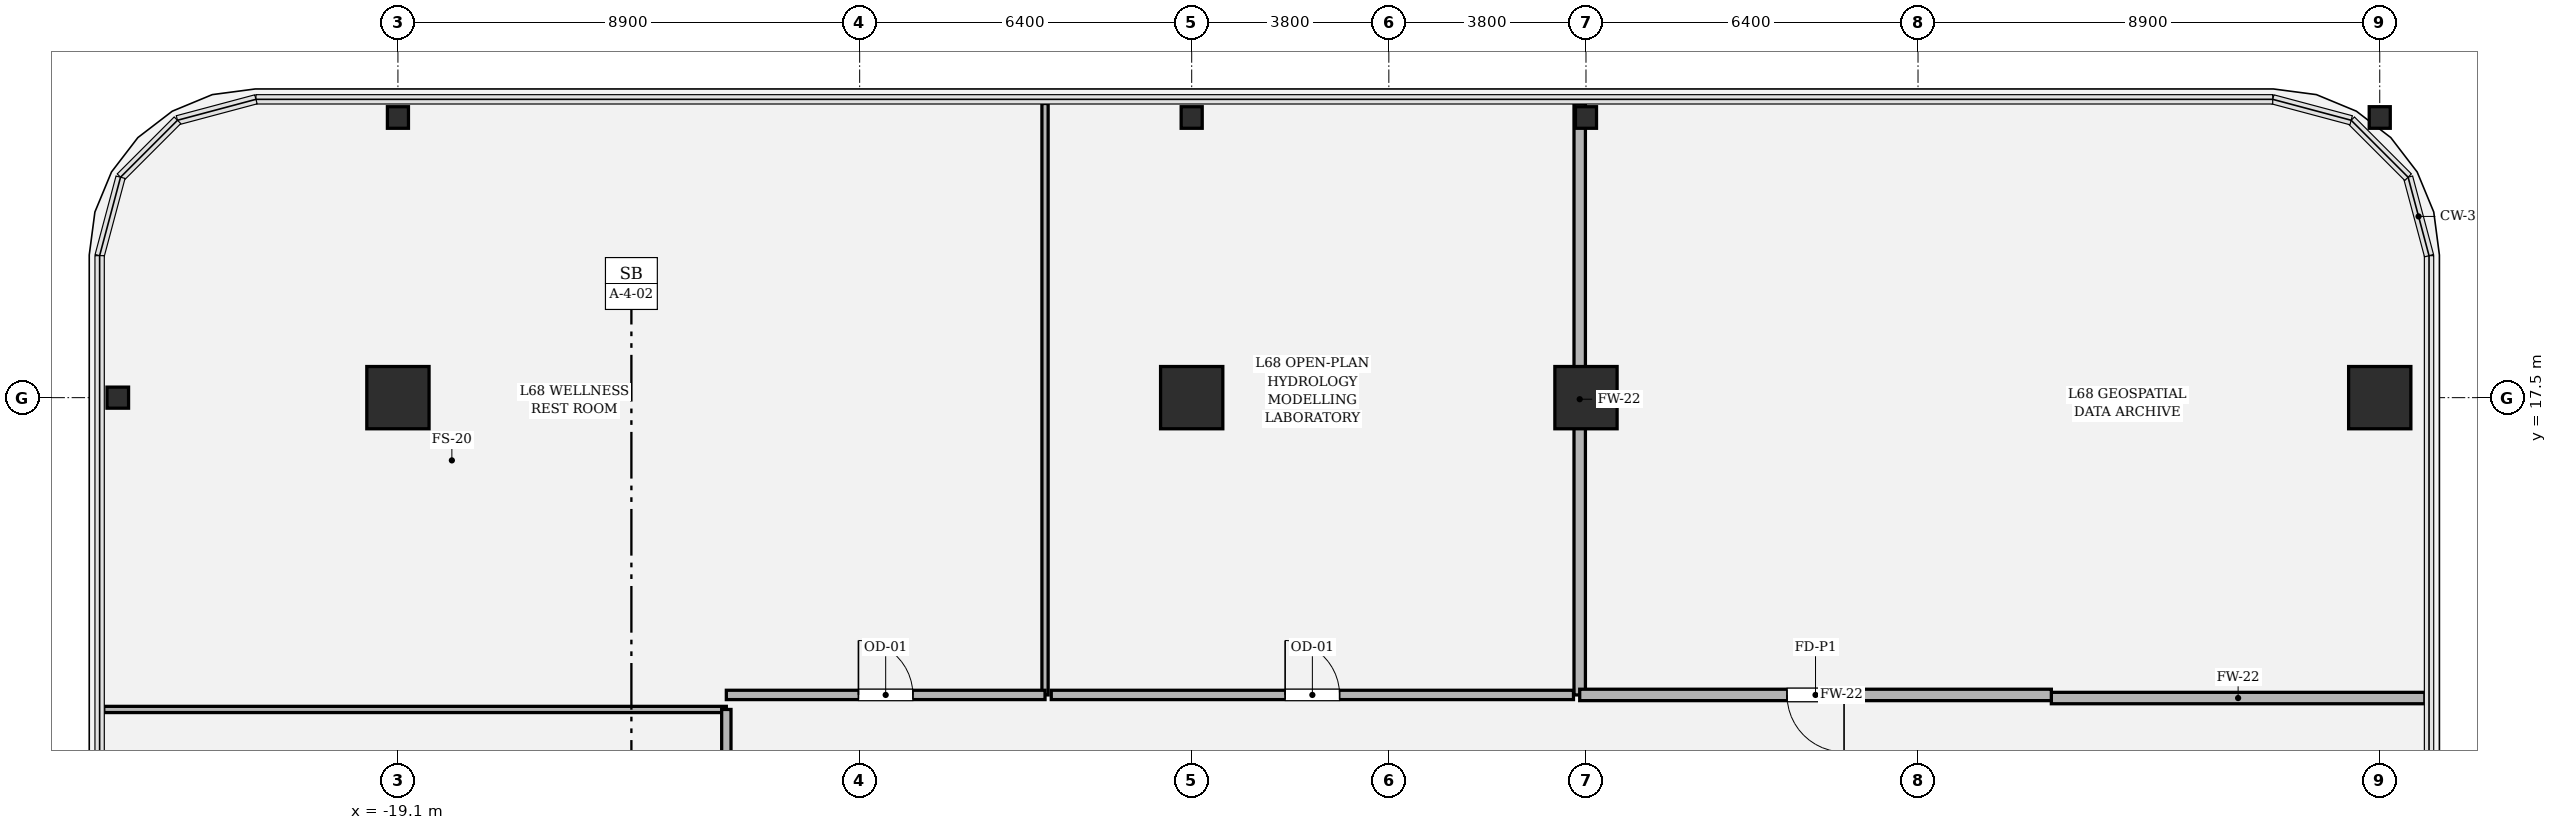
"""IFC4 building model, lengths in metres.
Left out: names, types, materials, properties, quantities, classifications, styles, units other than length and angle.
Written with IfcOpenShell. Run it as: python <this file> out.ifc"""

import sys

from ifc_helpers import new_model, si_unit, direction, frame, frame_2d, origin, origin_2d, place, context, subcontext, project, spatial, rectangle, hollow_rectangle, i_section, extrude, element, fill, save


model = new_model("IFC4")
c1 = context("Model", 3, precision=1e-05, world=origin(), true_north=direction((0.0, 1.0)))
c2 = subcontext(c1, "Body", "Model", "MODEL_VIEW")
j1 = project(units=[si_unit("LENGTHUNIT", "METRE"), si_unit("PLANEANGLEUNIT", "RADIAN")], contexts=[c1])
p1 = place(None, origin())
s1 = spatial("IfcSite", under=j1, at=p1, CompositionType="ELEMENT")
p2 = place(p1, origin())
s2 = spatial("IfcBuilding", under=s1, at=p2, CompositionType="ELEMENT")
p3 = place(p2, frame((0.0, 0.0, 288.0)))
s3 = spatial("IfcBuildingStorey", under=s2, at=p3, CompositionType="ELEMENT", Elevation=288.0)
for number, where, z_axis, x_axis in (
    (1, (19.1, 17.5, 0.0), (0.0, 0.0, 1.0), (1.0, 0.0, 0.0)),
    (2, (3.8, 17.5, 0.0), (0.0, 0.0, 1.0), (1.0, 0.0, 0.0)),
    (3, (-3.8, 17.5, 0.0), (0.0, 0.0, 1.0), (1.0, 0.0, 0.0)),
    (4, (-19.1, 17.5, 0.0), (0.0, 0.0, 1.0), (1.0, 0.0, 0.0)),
):
    element("IfcColumn", number, at=place(p3, frame(where, z_axis=z_axis, x_axis=x_axis)), inside=s3, PredefinedType="COLUMN", context=c2, shape_type="SweptSolid", body=[
        extrude(hollow_rectangle(XDim=1.2, YDim=1.2, WallThickness=0.035, at=origin_2d()), origin(), (0.0, 0.0, 1.0), 4.2),
    ])
for number, where, z_axis, x_axis in (
    (5, (-19.1, 22.9, 0.0), (0.0, 0.0, 1.0), (1.0, 0.0, 0.0)),
    (6, (-3.8, 22.9, 0.0), (0.0, 0.0, 1.0), (1.0, 0.0, 0.0)),
    (7, (3.8, 22.9, 0.0), (0.0, 0.0, 1.0), (1.0, 0.0, 0.0)),
    (8, (19.1, 22.9, 0.0), (0.0, 0.0, 1.0), (1.0, 0.0, 0.0)),
    (9, (-24.5, 17.5, 0.0), (0.0, 0.0, 1.0), (0.0, 1.0, 0.0)),
):
    element("IfcColumn", number, at=place(p3, frame(where, z_axis=z_axis, x_axis=x_axis)), inside=s3, PredefinedType="COLUMN", context=c2, shape_type="SweptSolid", body=[
        extrude(i_section(OverallWidth=0.406, OverallDepth=0.416, WebThickness=0.029, FlangeThickness=0.048, FilletRadius=0.018, at=origin_2d()), origin(), (0.0, 0.0, 1.0), 4.198),
    ])
p4 = place(p3, frame((-24.77, 11.49, 0.0), z_axis=(0.0, 0.0, 1.0), x_axis=(1.0, 0.0, 0.0)))
e10 = element("IfcWall", 10, at=p4, inside=s3, PredefinedType="PARTITIONING", context=c2, shape_type="SweptSolid", body=[
    extrude(rectangle(XDim=12.0, YDim=0.12, at=frame_2d((6.0, 0.0))), origin(), (0.0, 0.0, 1.0), 2.714),
])
p5 = place(p3, frame((-12.77, 11.49, 0.0), z_axis=(0.0, 0.0, 1.0), x_axis=(0.0, -1.0, 0.0)))
e11 = element("IfcWall", 11, at=p5, inside=s3, PredefinedType="PARTITIONING", context=c2, shape_type="SweptSolid", body=[
    extrude(rectangle(XDim=18.09, YDim=0.18, at=frame_2d((9.045, 0.0))), origin(), (0.0, 0.0, 1.0), 3.394),
])
p6 = place(p5, frame((8.345, 0.0, 0.0)))
e12 = element("IfcOpeningElement", 12, at=p6, cuts=e11, PredefinedType="OPENING", context=c2, shape_type="SweptSolid", body=[
    extrude(rectangle(XDim=1.4, YDim=2.25, at=frame_2d((0.7, 1.125))), frame((0.0, 0.1, 0.0), z_axis=(0.0, -1.0, 0.0), x_axis=(1.0, 0.0, 0.0)), (0.0, 0.0, 1.0), 0.2),
])
p7 = place(p3, frame((-6.627, 23.17, 0.0), z_axis=(0.0, 0.0, 1.0), x_axis=(0.0, -1.0, 0.0)))
e13 = element("IfcWall", 13, at=p7, inside=s3, PredefinedType="PARTITIONING", context=c2, shape_type="SweptSolid", body=[
    extrude(rectangle(XDim=11.4, YDim=0.12, at=frame_2d((5.7, 0.0))), origin(), (0.0, 0.0, 1.0), 2.714),
])
p8 = place(p3, frame((-6.627, 11.77, 0.0), z_axis=(0.0, 0.0, 1.0), x_axis=(-1.0, 0.0, 0.0)))
e14 = element("IfcWall", 14, at=p8, inside=s3, PredefinedType="PARTITIONING", context=c2, shape_type="SweptSolid", body=[
    extrude(rectangle(XDim=6.143, YDim=0.18, at=frame_2d((3.072, 0.0))), origin(), (0.0, 0.0, 1.0), 3.394),
])
p9 = place(p8, frame((2.546, 0.0, 0.0)))
e15 = element("IfcOpeningElement", 15, at=p9, cuts=e14, PredefinedType="OPENING", context=c2, shape_type="SweptSolid", body=[
    extrude(rectangle(XDim=1.05, YDim=2.2, at=frame_2d((0.525, 1.1))), frame((0.0, 0.1, 0.0), z_axis=(0.0, -1.0, 0.0), x_axis=(1.0, 0.0, 0.0)), (0.0, 0.0, 1.0), 0.2),
])
p10 = place(p3, frame((3.679, 11.77, 0.0), z_axis=(0.0, 0.0, 1.0), x_axis=(0.0, 1.0, 0.0)))
e16 = element("IfcWall", 16, at=p10, inside=s3, PredefinedType="SOLIDWALL", context=c2, shape_type="SweptSolid", body=[
    extrude(rectangle(XDim=11.4, YDim=0.22, at=frame_2d((5.7, 0.0))), origin(), (0.0, 0.0, 1.0), 2.674),
])
p11 = place(p3, frame((19.97, 11.71, 0.0), z_axis=(0.0, 0.0, 1.0), x_axis=(-1.0, 0.0, 0.0)))
e17 = element("IfcWall", 17, at=p11, inside=s3, PredefinedType="SOLIDWALL", context=c2, shape_type="SweptSolid", body=[
    extrude(rectangle(XDim=7.2, YDim=0.22, at=frame_2d((3.6, 0.0))), origin(), (0.0, 0.0, 1.0), 3.394),
])
p12 = place(p3, frame((12.77, 11.77, 0.0), z_axis=(0.0, 0.0, 1.0), x_axis=(-1.0, 0.0, 0.0)))
e18 = element("IfcWall", 18, at=p12, inside=s3, PredefinedType="SOLIDWALL", context=c2, shape_type="SweptSolid", body=[
    extrude(rectangle(XDim=9.091, YDim=0.22, at=frame_2d((4.545, 0.0))), origin(), (0.0, 0.0, 1.0), 3.394),
])
p13 = place(p12, frame((3.996, 0.0, 0.0)))
e19 = element("IfcOpeningElement", 19, at=p13, cuts=e18, PredefinedType="OPENING", context=c2, shape_type="SweptSolid", body=[
    extrude(rectangle(XDim=1.1, YDim=2.2, at=frame_2d((0.55, 1.1))), frame((0.0, 0.12, 0.0), z_axis=(0.0, -1.0, 0.0), x_axis=(1.0, 0.0, 0.0)), (0.0, 0.0, 1.0), 0.24),
])
p14 = place(p3, frame((3.559, 11.77, 0.0), z_axis=(0.0, 0.0, 1.0), x_axis=(-1.0, 0.0, 0.0)))
e20 = element("IfcWall", 20, at=p14, inside=s3, PredefinedType="PARTITIONING", context=c2, shape_type="SweptSolid", body=[
    extrude(rectangle(XDim=10.066, YDim=0.18, at=frame_2d((5.033, 0.0))), origin(), (0.0, 0.0, 1.0), 3.394),
])
p15 = place(p14, frame((4.508, 0.0, 0.0)))
e21 = element("IfcOpeningElement", 21, at=p15, cuts=e20, PredefinedType="OPENING", context=c2, shape_type="SweptSolid", body=[
    extrude(rectangle(XDim=1.05, YDim=2.2, at=frame_2d((0.525, 1.1))), frame((0.0, 0.1, 0.0), z_axis=(0.0, -1.0, 0.0), x_axis=(1.0, 0.0, 0.0)), (0.0, 0.0, 1.0), 0.2),
])
p16 = place(p9, origin())
e22 = element("IfcDoor", 22, at=p16, inside=s3, OperationType="SINGLE_SWING_RIGHT", PredefinedType="DOOR", context=c2, shape_type="SweptSolid", body=[
    extrude(rectangle(XDim=1.05, YDim=2.2, at=frame_2d((0.525, 1.1))), frame((0.0, 0.025, 0.0), z_axis=(0.0, -1.0, 0.0), x_axis=(1.0, 0.0, 0.0)), (0.0, 0.0, 1.0), 0.05),
])
fill(e15, e22)
p17 = place(p13, origin())
e23 = element("IfcDoor", 23, at=p17, inside=s3, OperationType="SINGLE_SWING_LEFT", PredefinedType="DOOR", context=c2, shape_type="SweptSolid", body=[
    extrude(rectangle(XDim=1.1, YDim=2.2, at=frame_2d((0.55, 1.1))), frame((0.0, 0.025, 0.0), z_axis=(0.0, -1.0, 0.0), x_axis=(1.0, 0.0, 0.0)), (0.0, 0.0, 1.0), 0.05),
])
fill(e19, e23)
p18 = place(p15, origin())
e24 = element("IfcDoor", 24, at=p18, inside=s3, OperationType="SINGLE_SWING_RIGHT", PredefinedType="DOOR", context=c2, shape_type="SweptSolid", body=[
    extrude(rectangle(XDim=1.05, YDim=2.2, at=frame_2d((0.525, 1.1))), frame((0.0, 0.025, 0.0), z_axis=(0.0, -1.0, 0.0), x_axis=(1.0, 0.0, 0.0)), (0.0, 0.0, 1.0), 0.05),
])
fill(e21, e24)
save(model, sys.argv[1])
